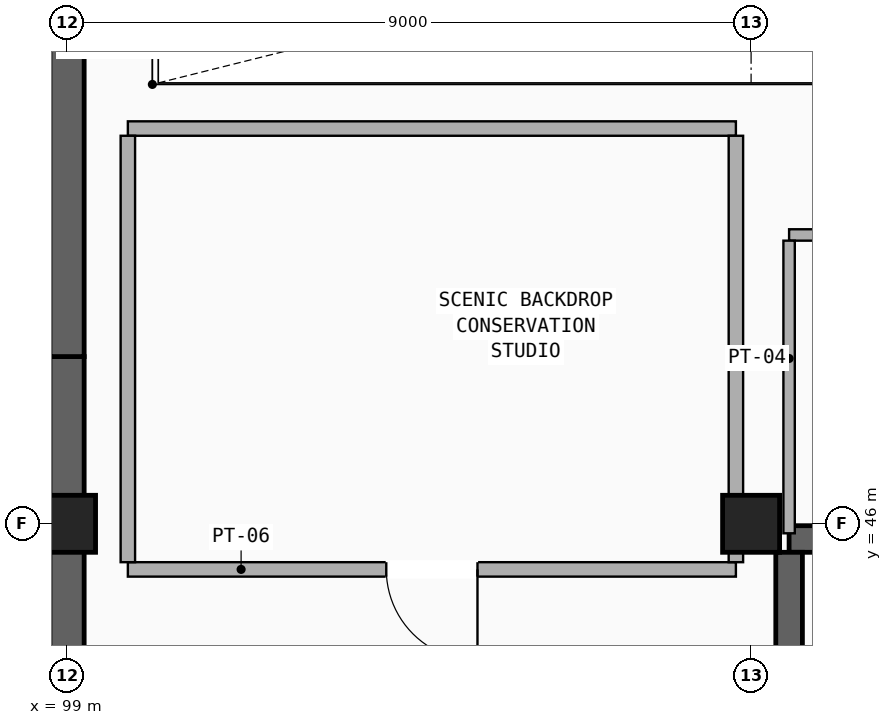
"""IFC4 building model, lengths in metres.
Left out: names, types, materials, properties, quantities, classifications, styles, units other than length and angle.
Written with IfcOpenShell. Run it as: python <this file> out.ifc"""

import sys

from ifc_helpers import new_model, si_unit, direction, frame, frame_2d, origin, origin_2d, place, context, subcontext, project, spatial, rectangle, extrude, element, fill, save


model = new_model("IFC4")
c1 = context("Model", 3, precision=1e-05, world=origin(), true_north=direction((0.0, 1.0)))
c2 = subcontext(c1, "Body", "Model", "MODEL_VIEW")
j1 = project(units=[si_unit("LENGTHUNIT", "METRE"), si_unit("PLANEANGLEUNIT", "RADIAN")], contexts=[c1])
p1 = place(None, origin())
s1 = spatial("IfcSite", under=j1, at=p1, CompositionType="ELEMENT")
p2 = place(p1, origin())
s2 = spatial("IfcBuilding", under=s1, at=p2, CompositionType="ELEMENT")
p3 = place(p2, frame((0.0, 0.0, 9.52)))
s3 = spatial("IfcBuildingStorey", under=s2, at=p3, CompositionType="ELEMENT", Elevation=9.52)
for number, where, z_axis, x_axis in (
    (1, (99.0, 46.0, 0.0), (0.0, 0.0, 1.0), (1.0, 0.0, 0.0)),
    (2, (108.0, 46.0, 0.0), (0.0, 0.0, 1.0), (1.0, 0.0, 0.0)),
):
    element("IfcColumn", number, at=place(p3, frame(where, z_axis=z_axis, x_axis=x_axis)), inside=s3, PredefinedType="COLUMN", context=c2, shape_type="SweptSolid", body=[
        extrude(rectangle(XDim=0.75, YDim=0.75, at=origin_2d()), origin(), (0.0, 0.0, 1.0), 4.08),
    ])
p4 = place(p3, frame((99.0, 37.45, 0.0), z_axis=(0.0, 0.0, 1.0), x_axis=(0.0, 1.0, 0.0)))
e3 = element("IfcWall", 3, at=p4, inside=s3, PredefinedType="SHEAR", context=c2, shape_type="SweptSolid", body=[
    extrude(rectangle(XDim=10.75, YDim=0.45, at=frame_2d((5.375, 0.0))), origin(), (0.0, 0.0, 1.0), 4.08),
])
p5 = place(p3, frame((99.0, 48.2, 0.0), z_axis=(0.0, 0.0, 1.0), x_axis=(0.0, 1.0, 0.0)))
e4 = element("IfcWall", 4, at=p5, inside=s3, PredefinedType="SHEAR", context=c2, shape_type="SweptSolid", body=[
    extrude(rectangle(XDim=15.6, YDim=0.45, at=frame_2d((7.8, 0.0))), origin(), (0.0, 0.0, 1.0), 4.08),
])
p6 = place(p3, frame((108.5, 45.8, 0.0), z_axis=(0.0, 0.0, 1.0), x_axis=(1.0, 0.0, 0.0)))
e5 = element("IfcWall", 5, at=p6, inside=s3, PredefinedType="SHEAR", context=c2, shape_type="SweptSolid", body=[
    extrude(rectangle(XDim=10.3, YDim=0.35, at=frame_2d((5.15, 0.0))), origin(), (0.0, 0.0, 1.0), 4.08),
])
p7 = place(p6, frame((0.45, 0.0, 0.0)))
e6 = element("IfcOpeningElement", 6, at=p7, cuts=e5, PredefinedType="OPENING", context=c2, shape_type="SweptSolid", body=[
    extrude(rectangle(XDim=1.1, YDim=2.2, at=frame_2d((0.55, 1.1))), frame((0.0, 0.185, 0.0), z_axis=(0.0, -1.0, 0.0), x_axis=(1.0, 0.0, 0.0)), (0.0, 0.0, 1.0), 0.37),
])
p8 = place(p6, frame((4.475, 0.0, 0.0)))
e7 = element("IfcOpeningElement", 7, at=p8, cuts=e5, PredefinedType="OPENING", context=c2, shape_type="SweptSolid", body=[
    extrude(rectangle(XDim=1.65, YDim=2.34, at=frame_2d((0.825, 1.17))), frame((0.0, 0.185, 0.0), z_axis=(0.0, -1.0, 0.0), x_axis=(1.0, 0.0, 0.0)), (0.0, 0.0, 1.0), 0.37),
])
p9 = place(p3, frame((108.5, 37.375, 0.0), z_axis=(0.0, 0.0, 1.0), x_axis=(0.0, 1.0, 0.0)))
e8 = element("IfcWall", 8, at=p9, inside=s3, PredefinedType="SHEAR", context=c2, shape_type="SweptSolid", body=[
    extrude(rectangle(XDim=8.25, YDim=0.35, at=frame_2d((4.125, 0.0))), origin(), (0.0, 0.0, 1.0), 4.08),
])
p10 = place(p3, frame((108.5, 49.8, 0.0), z_axis=(0.0, 0.0, 1.0), x_axis=(1.0, 0.0, 0.0)))
e9 = element("IfcWall", 9, at=p10, inside=s3, PredefinedType="PARTITIONING", context=c2, shape_type="SweptSolid", body=[
    extrude(rectangle(XDim=10.3, YDim=0.15, at=frame_2d((5.15, 0.0))), origin(), (0.0, 0.0, 1.0), 3.84),
])
p11 = place(p10, frame((4.45, 0.0, 0.0)))
e10 = element("IfcOpeningElement", 10, at=p11, cuts=e9, PredefinedType="OPENING", context=c2, shape_type="SweptSolid", body=[
    extrude(rectangle(XDim=1.4, YDim=2.2, at=frame_2d((0.7, 1.1))), frame((0.0, 0.085, 0.0), z_axis=(0.0, -1.0, 0.0), x_axis=(1.0, 0.0, 0.0)), (0.0, 0.0, 1.0), 0.17),
])
p12 = place(p3, frame((108.5, 45.875, 0.0), z_axis=(0.0, 0.0, 1.0), x_axis=(0.0, 1.0, 0.0)))
e11 = element("IfcWall", 11, at=p12, inside=s3, PredefinedType="PARTITIONING", context=c2, shape_type="SweptSolid", body=[
    extrude(rectangle(XDim=3.85, YDim=0.15, at=frame_2d((1.925, 0.0))), origin(), (0.0, 0.0, 1.0), 2.92),
])
p13 = place(p3, frame((99.8, 45.4, 0.0), z_axis=(0.0, 0.0, 1.0), x_axis=(1.0, 0.0, 0.0)))
e12 = element("IfcWall", 12, at=p13, inside=s3, PredefinedType="PARTITIONING", context=c2, shape_type="SweptSolid", body=[
    extrude(rectangle(XDim=8.0, YDim=0.19, at=frame_2d((4.0, 0.0))), origin(), (0.0, 0.0, 1.0), 3.12),
])
p14 = place(p13, frame((3.4, 0.0, 0.0)))
e13 = element("IfcOpeningElement", 13, at=p14, cuts=e12, PredefinedType="OPENING", context=c2, shape_type="SweptSolid", body=[
    extrude(rectangle(XDim=1.2, YDim=2.2, at=frame_2d((0.6, 1.1))), frame((0.0, 0.105, 0.0), z_axis=(0.0, -1.0, 0.0), x_axis=(1.0, 0.0, 0.0)), (0.0, 0.0, 1.0), 0.21),
])
p15 = place(p3, frame((99.8, 51.2, 0.0), z_axis=(0.0, 0.0, 1.0), x_axis=(1.0, 0.0, 0.0)))
e14 = element("IfcWall", 14, at=p15, inside=s3, PredefinedType="PARTITIONING", context=c2, shape_type="SweptSolid", body=[
    extrude(rectangle(XDim=8.0, YDim=0.19, at=frame_2d((4.0, 0.0))), origin(), (0.0, 0.0, 1.0), 3.84),
])
p16 = place(p3, frame((99.8, 45.495, 0.0), z_axis=(0.0, 0.0, 1.0), x_axis=(0.0, 1.0, 0.0)))
e15 = element("IfcWall", 15, at=p16, inside=s3, PredefinedType="PARTITIONING", context=c2, shape_type="SweptSolid", body=[
    extrude(rectangle(XDim=5.61, YDim=0.19, at=frame_2d((2.805, 0.0))), origin(), (0.0, 0.0, 1.0), 3.07),
])
p17 = place(p3, frame((107.8, 45.495, 0.0), z_axis=(0.0, 0.0, 1.0), x_axis=(0.0, 1.0, 0.0)))
e16 = element("IfcWall", 16, at=p17, inside=s3, PredefinedType="PARTITIONING", context=c2, shape_type="SweptSolid", body=[
    extrude(rectangle(XDim=5.61, YDim=0.19, at=frame_2d((2.805, 0.0))), origin(), (0.0, 0.0, 1.0), 2.92),
])
p18 = place(p14, frame((1.2, 0.0, 0.0), z_axis=(0.0, 0.0, 1.0), x_axis=(-1.0, 0.0, 0.0)))
e17 = element("IfcDoor", 17, at=p18, inside=s3, OperationType="SINGLE_SWING_LEFT", PredefinedType="DOOR", context=c2, shape_type="SweptSolid", body=[
    extrude(rectangle(XDim=1.2, YDim=2.2, at=frame_2d((0.6, 1.1))), frame((0.0, 0.025, 0.0), z_axis=(0.0, -1.0, 0.0), x_axis=(1.0, 0.0, 0.0)), (0.0, 0.0, 1.0), 0.05),
])
fill(e13, e17)
save(model, sys.argv[1])
